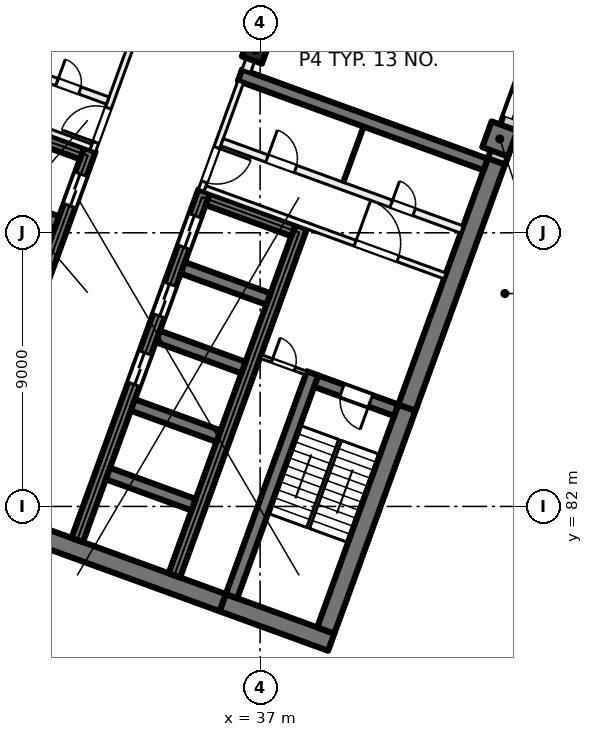
"""IFC4 building model, lengths in metres.
Left out: names, types, materials, properties, quantities, classifications, styles, units other than length and angle.
Written with IfcOpenShell. Run it as: python <this file> out.ifc"""

import sys

from ifc_helpers import new_model, si_unit, direction, frame, frame_2d, origin, origin_2d, place, context, subcontext, project, spatial, rectangle, extrude, element, fill, save


model = new_model("IFC4")
c1 = context("Model", 3, precision=1e-05, world=origin(), true_north=direction((0.0, 1.0)))
c2 = subcontext(c1, "Body", "Model", "MODEL_VIEW")
j1 = project(units=[si_unit("LENGTHUNIT", "METRE"), si_unit("PLANEANGLEUNIT", "RADIAN")], contexts=[c1])
p1 = place(None, origin())
s1 = spatial("IfcSite", under=j1, at=p1, CompositionType="ELEMENT")
p2 = place(p1, origin())
s2 = spatial("IfcBuilding", under=s1, at=p2, CompositionType="ELEMENT")
p3 = place(p2, frame((0.0, 0.0, 43.5)))
s3 = spatial("IfcBuildingStorey", under=s2, at=p3, CompositionType="ELEMENT", Elevation=43.5)
p4 = place(p3, frame((36.849, 97.011, 0.0), z_axis=(0.0, 0.0, 1.0), x_axis=(-0.342020143326, -0.939692620786, 0.0)))
e1 = element("IfcColumn", 1, at=p4, inside=s3, PredefinedType="COLUMN", context=c2, shape_type="SweptSolid", body=[
    extrude(rectangle(XDim=0.7, YDim=0.7, at=origin_2d()), origin(), (0.0, 0.0, 1.0), 4.0),
])
p5 = place(p3, frame((44.884, 94.087, 0.0), z_axis=(0.0, 0.0, 1.0), x_axis=(-0.342020143326, -0.939692620786, 0.0)))
e2 = element("IfcColumn", 2, at=p5, inside=s3, PredefinedType="COLUMN", context=c2, shape_type="SweptSolid", body=[
    extrude(rectangle(XDim=0.9, YDim=0.9, at=origin_2d()), origin(), (0.0, 0.0, 1.0), 4.0),
])
p6 = place(p3, frame((39.338, 77.535, 0.0), z_axis=(0.0, 0.0, 1.0), x_axis=(-0.939701471648, 0.341995824804, 0.0)))
e3 = element("IfcWall", 3, at=p6, inside=s3, PredefinedType="SHEAR", context=c2, shape_type="SweptSolid", body=[
    extrude(rectangle(XDim=3.8, YDim=0.6, at=frame_2d((1.9, 0.0))), origin(), (0.0, 0.0, 1.0), 4.0),
])
p7 = place(p3, frame((35.767, 78.835, 0.0), z_axis=(0.0, 0.0, 1.0), x_axis=(-0.939692894512, 0.342019391267, 0.0)))
e4 = element("IfcWall", 4, at=p7, inside=s3, PredefinedType="SHEAR", context=c2, shape_type="SweptSolid", body=[
    extrude(rectangle(XDim=14.4, YDim=0.6, at=frame_2d((7.2, 0.0))), origin(), (0.0, 0.0, 1.0), 4.0),
])
p8 = place(p3, frame((39.159, 77.92, 0.0), z_axis=(0.0, 0.0, 1.0), x_axis=(0.342016982193, 0.939693771338, 0.0)))
e5 = element("IfcWall", 5, at=p8, inside=s3, PredefinedType="SHEAR", context=c2, shape_type="SweptSolid", body=[
    extrude(rectangle(XDim=7.8, YDim=0.6, at=frame_2d((3.9, 0.0))), origin(), (0.0, 0.0, 1.0), 4.0),
])
p9 = place(p3, frame((41.827, 85.249, 0.0), z_axis=(0.0, 0.0, 1.0), x_axis=(0.342016162452, 0.939694069696, 0.0)))
e6 = element("IfcWall", 6, at=p9, inside=s3, PredefinedType="SHEAR", context=c2, shape_type="SweptSolid", body=[
    extrude(rectangle(XDim=8.9, YDim=0.6, at=frame_2d((4.45, 0.0))), origin(), (0.0, 0.0, 1.0), 4.0),
])
p10 = place(p3, frame((36.058, 79.048, 0.0), z_axis=(0.0, 0.0, 1.0), x_axis=(0.342016982193, 0.939693771338, 0.0)))
e7 = element("IfcWall", 7, at=p10, inside=s3, PredefinedType="SHEAR", context=c2, shape_type="SweptSolid", body=[
    extrude(rectangle(XDim=7.8, YDim=0.4, at=frame_2d((3.9, 0.0))), origin(), (0.0, 0.0, 1.0), 4.0),
])
p11 = place(p3, frame((41.476, 85.164, 0.0), z_axis=(0.0, 0.0, 1.0), x_axis=(-0.939678810556, 0.342058084236, 0.0)))
e8 = element("IfcWall", 8, at=p11, inside=s3, PredefinedType="SHEAR", context=c2, shape_type="SweptSolid", body=[
    extrude(rectangle(XDim=2.8, YDim=0.4, at=frame_2d((1.4, 0.0))), origin(), (0.0, 0.0, 1.0), 4.0),
])
p12 = place(p11, frame((0.9, 0.0, 0.0)))
e9 = element("IfcOpeningElement", 9, at=p12, cuts=e8, PredefinedType="OPENING", context=c2, shape_type="SweptSolid", body=[
    extrude(rectangle(XDim=1.0, YDim=2.1, at=frame_2d((0.5, 1.05))), frame((0.0, 0.21, 0.0), z_axis=(0.0, -1.0, 0.0), x_axis=(1.0, 0.0, 0.0)), (0.0, 0.0, 1.0), 0.42),
])
p13 = place(p3, frame((30.984, 80.895, 0.0), z_axis=(0.0, 0.0, 1.0), x_axis=(0.342021021735, 0.939692301071, 0.0)))
e10 = element("IfcWall", 10, at=p13, inside=s3, PredefinedType="SHEAR", context=c2, shape_type="SweptSolid", body=[
    extrude(rectangle(XDim=12.2, YDim=0.4, at=frame_2d((6.1, 0.0))), origin(), (0.0, 0.0, 1.0), 4.0),
])
p14 = place(p13, frame((5.45, 0.0, 0.0)))
e11 = element("IfcOpeningElement", 11, at=p14, cuts=e10, PredefinedType="OPENING", context=c2, shape_type="SweptSolid", body=[
    extrude(rectangle(XDim=1.1, YDim=2.1, at=frame_2d((0.55, 1.05))), frame((0.0, 0.21, 0.0), z_axis=(0.0, -1.0, 0.0), x_axis=(1.0, 0.0, 0.0)), (0.0, 0.0, 1.0), 0.42),
])
p15 = place(p13, frame((7.85, 0.0, 0.0)))
e12 = element("IfcOpeningElement", 12, at=p15, cuts=e10, PredefinedType="OPENING", context=c2, shape_type="SweptSolid", body=[
    extrude(rectangle(XDim=1.1, YDim=2.1, at=frame_2d((0.55, 1.05))), frame((0.0, 0.21, 0.0), z_axis=(0.0, -1.0, 0.0), x_axis=(1.0, 0.0, 0.0)), (0.0, 0.0, 1.0), 0.42),
])
p16 = place(p13, frame((10.25, 0.0, 0.0)))
e13 = element("IfcOpeningElement", 13, at=p16, cuts=e10, PredefinedType="OPENING", context=c2, shape_type="SweptSolid", body=[
    extrude(rectangle(XDim=1.1, YDim=2.1, at=frame_2d((0.55, 1.05))), frame((0.0, 0.21, 0.0), z_axis=(0.0, -1.0, 0.0), x_axis=(1.0, 0.0, 0.0)), (0.0, 0.0, 1.0), 0.42),
])
p17 = place(p3, frame((34.178, 79.732, 0.0), z_axis=(0.0, 0.0, 1.0), x_axis=(0.342014590177, 0.939694641948, 0.0)))
e14 = element("IfcWall", 14, at=p17, inside=s3, PredefinedType="SHEAR", context=c2, shape_type="SweptSolid", body=[
    extrude(rectangle(XDim=12.2, YDim=0.4, at=frame_2d((6.1, 0.0))), origin(), (0.0, 0.0, 1.0), 4.0),
])
for number, where, z_axis, x_axis in (
    (15, (34.812, 82.056, 0.0), (0.0, 0.0, 1.0), (-0.94, 0.342, 0.0)),
    (16, (35.632, 84.311, 0.0), (0.0, 0.0, 1.0), (-0.94, 0.342, 0.0)),
    (17, (36.453, 86.566, 0.0), (0.0, 0.0, 1.0), (-0.94, 0.342, 0.0)),
    (18, (37.274, 88.822, 0.0), (0.0, 0.0, 1.0), (-0.94, 0.342, 0.0)),
):
    element("IfcWall", number, at=place(p3, frame(where, z_axis=z_axis, x_axis=x_axis)), inside=s3, PredefinedType="SHEAR", context=c2, shape_type="SweptSolid", body=[
        extrude(rectangle(XDim=3.0, YDim=0.4, at=frame_2d((1.5, 0.0))), origin(), (0.0, 0.0, 1.0), 4.0),
    ])
p18 = place(p3, frame((38.095, 91.077, 0.0), z_axis=(0.0, 0.0, 1.0), x_axis=(-0.939676934218, 0.342063238742, 0.0)))
e19 = element("IfcWall", 19, at=p18, inside=s3, PredefinedType="SHEAR", context=c2, shape_type="SweptSolid", body=[
    extrude(rectangle(XDim=3.0, YDim=0.4, at=frame_2d((1.5, 0.0))), origin(), (0.0, 0.0, 1.0), 4.0),
])
p19 = place(p3, frame((27.225, 82.263, 0.0), z_axis=(0.0, 0.0, 1.0), x_axis=(0.342014590177, 0.939694641948, 0.0)))
e20 = element("IfcWall", 20, at=p19, inside=s3, PredefinedType="SHEAR", context=c2, shape_type="SweptSolid", body=[
    extrude(rectangle(XDim=12.2, YDim=0.4, at=frame_2d((6.1, 0.0))), origin(), (0.0, 0.0, 1.0), 4.0),
])
p20 = place(p19, frame((10.25, 0.0, 0.0)))
e21 = element("IfcOpeningElement", 21, at=p20, cuts=e20, PredefinedType="OPENING", context=c2, shape_type="SweptSolid", body=[
    extrude(rectangle(XDim=1.1, YDim=2.1, at=frame_2d((0.55, 1.05))), frame((0.0, 0.21, 0.0), z_axis=(0.0, -1.0, 0.0), x_axis=(1.0, 0.0, 0.0)), (0.0, 0.0, 1.0), 0.42),
])
p21 = place(p19, frame((0.7, 0.0, 0.0)))
e22 = element("IfcOpeningElement", 22, at=p21, cuts=e20, PredefinedType="OPENING", context=c2, shape_type="SweptSolid", body=[
    extrude(rectangle(XDim=0.8, YDim=2.1, at=frame_2d((0.4, 1.05))), frame((0.0, 0.21, 0.0), z_axis=(0.0, -1.0, 0.0), x_axis=(1.0, 0.0, 0.0)), (0.0, 0.0, 1.0), 0.42),
])
for number, where, z_axis, x_axis in (
    (23, (30.32, 91.353, 0.0), (0.0, 0.0, 1.0), (-0.94, 0.342, 0.0)),
    (24, (31.141, 93.608, 0.0), (0.0, 0.0, 1.0), (-0.94, 0.342, 0.0)),
):
    element("IfcWall", number, at=place(p3, frame(where, z_axis=z_axis, x_axis=x_axis)), inside=s3, PredefinedType="SHEAR", context=c2, shape_type="SweptSolid", body=[
        extrude(rectangle(XDim=3.0, YDim=0.4, at=frame_2d((1.5, 0.0))), origin(), (0.0, 0.0, 1.0), 4.0),
    ])
p22 = place(p3, frame((44.418, 93.245, 0.0), z_axis=(0.0, 0.0, 1.0), x_axis=(-0.93969060187, 0.342025690201, 0.0)))
e25 = element("IfcWall", 25, at=p22, inside=s3, PredefinedType="SHEAR", context=c2, shape_type="SweptSolid", body=[
    extrude(rectangle(XDim=8.6, YDim=0.4, at=frame_2d((4.3, 0.0))), origin(), (0.0, 0.0, 1.0), 4.0),
])
p23 = place(p3, frame((52.212, 113.783, 0.0), z_axis=(0.0, 0.0, 1.0), x_axis=(-0.34202521188, -0.939690775968, 0.0)))
e26 = element("IfcWall", 26, at=p23, inside=s3, PredefinedType="SOLIDWALL", context=c2, shape_type="SweptSolid", body=[
    extrude(rectangle(XDim=21.745, YDim=0.6, at=frame_2d((10.873, 0.0))), origin(), (0.0, 0.0, 1.0), 3.625),
])
p24 = place(p23, frame((4.365, 0.0, 0.0)))
e27 = element("IfcOpeningElement", 27, at=p24, cuts=e26, PredefinedType="OPENING", context=c2, shape_type="SweptSolid", body=[
    extrude(rectangle(XDim=1.8, YDim=2.4, at=frame_2d((0.9, 1.2))), frame((0.0, 0.31, 0.0), z_axis=(0.0, -1.0, 0.0), x_axis=(1.0, 0.0, 0.0)), (0.0, 0.0, 1.0), 0.62),
])
p25 = place(p23, frame((8.265, 0.0, 0.9)))
e28 = element("IfcOpeningElement", 28, at=p25, cuts=e26, PredefinedType="OPENING", context=c2, shape_type="SweptSolid", body=[
    extrude(rectangle(XDim=3.0, YDim=2.4, at=frame_2d((1.5, 1.2))), frame((0.0, 0.31, 0.0), z_axis=(0.0, -1.0, 0.0), x_axis=(1.0, 0.0, 0.0)), (0.0, 0.0, 1.0), 0.62),
])
p26 = place(p23, frame((12.765, 0.0, 0.9)))
e29 = element("IfcOpeningElement", 29, at=p26, cuts=e26, PredefinedType="OPENING", context=c2, shape_type="SweptSolid", body=[
    extrude(rectangle(XDim=3.0, YDim=2.4, at=frame_2d((1.5, 1.2))), frame((0.0, 0.31, 0.0), z_axis=(0.0, -1.0, 0.0), x_axis=(1.0, 0.0, 0.0)), (0.0, 0.0, 1.0), 0.62),
])
p27 = place(p23, frame((17.265, 0.0, 0.9)))
e30 = element("IfcOpeningElement", 30, at=p27, cuts=e26, PredefinedType="OPENING", context=c2, shape_type="SweptSolid", body=[
    extrude(rectangle(XDim=3.0, YDim=2.4, at=frame_2d((1.5, 1.2))), frame((0.0, 0.31, 0.0), z_axis=(0.0, -1.0, 0.0), x_axis=(1.0, 0.0, 0.0)), (0.0, 0.0, 1.0), 0.62),
])
p28 = place(p3, frame((31.491, 93.693, 0.0), z_axis=(0.0, 0.0, 1.0), x_axis=(0.341995824804, 0.939701471648, 0.0)))
e31 = element("IfcWall", 31, at=p28, inside=s3, PredefinedType="PARTITIONING", context=c2, shape_type="SweptSolid", body=[
    extrude(rectangle(XDim=3.8, YDim=0.2, at=frame_2d((1.9, 0.0))), origin(), (0.0, 0.0, 1.0), 3.625),
])
p29 = place(p28, frame((0.3, 0.0, 0.0)))
e32 = element("IfcOpeningElement", 32, at=p29, cuts=e31, PredefinedType="OPENING", context=c2, shape_type="SweptSolid", body=[
    extrude(rectangle(XDim=1.2, YDim=2.1, at=frame_2d((0.6, 1.05))), frame((0.0, 0.11, 0.0), z_axis=(0.0, -1.0, 0.0), x_axis=(1.0, 0.0, 0.0)), (0.0, 0.0, 1.0), 0.22),
])
p30 = place(p3, frame((23.538, 96.694, 0.0), z_axis=(0.0, 0.0, 1.0), x_axis=(0.939691552312, -0.342023078919, 0.0)))
e33 = element("IfcWall", 33, at=p30, inside=s3, PredefinedType="PARTITIONING", context=c2, shape_type="SweptSolid", body=[
    extrude(rectangle(XDim=8.4, YDim=0.2, at=frame_2d((4.2, 0.0))), origin(), (0.0, 0.0, 1.0), 3.625),
])
p31 = place(p30, frame((1.65, 0.0, 0.0)))
e34 = element("IfcOpeningElement", 34, at=p31, cuts=e33, PredefinedType="OPENING", context=c2, shape_type="SweptSolid", body=[
    extrude(rectangle(XDim=1.5, YDim=2.1, at=frame_2d((0.75, 1.05))), frame((0.0, 0.11, 0.0), z_axis=(0.0, -1.0, 0.0), x_axis=(1.0, 0.0, 0.0)), (0.0, 0.0, 1.0), 0.22),
])
p32 = place(p3, frame((24.094, 98.221, 0.0), z_axis=(0.0, 0.0, 1.0), x_axis=(0.939691552312, -0.342023078919, 0.0)))
e35 = element("IfcWall", 35, at=p32, inside=s3, PredefinedType="PARTITIONING", context=c2, shape_type="SweptSolid", body=[
    extrude(rectangle(XDim=8.4, YDim=0.25, at=frame_2d((4.2, 0.0))), origin(), (0.0, 0.0, 1.0), 3.625),
])
p33 = place(p32, frame((6.625, 0.0, 0.0)))
e36 = element("IfcOpeningElement", 36, at=p33, cuts=e35, PredefinedType="OPENING", context=c2, shape_type="SweptSolid", body=[
    extrude(rectangle(XDim=0.8, YDim=2.1, at=frame_2d((0.4, 1.05))), frame((0.0, 0.135, 0.0), z_axis=(0.0, -1.0, 0.0), x_axis=(1.0, 0.0, 0.0)), (0.0, 0.0, 1.0), 0.27),
])
p34 = place(p32, frame((2.375, 0.0, 0.0)))
e37 = element("IfcOpeningElement", 37, at=p34, cuts=e35, PredefinedType="OPENING", context=c2, shape_type="SweptSolid", body=[
    extrude(rectangle(XDim=0.8, YDim=2.1, at=frame_2d((0.4, 1.05))), frame((0.0, 0.135, 0.0), z_axis=(0.0, -1.0, 0.0), x_axis=(1.0, 0.0, 0.0)), (0.0, 0.0, 1.0), 0.27),
])
p35 = place(p3, frame((36.362, 95.964, 0.0), z_axis=(0.0, 0.0, 1.0), x_axis=(-0.341995824804, -0.939701471648, 0.0)))
e38 = element("IfcWall", 38, at=p35, inside=s3, PredefinedType="PARTITIONING", context=c2, shape_type="SweptSolid", body=[
    extrude(rectangle(XDim=3.8, YDim=0.2, at=frame_2d((1.9, 0.0))), origin(), (0.0, 0.0, 1.0), 3.625),
])
p36 = place(p35, frame((2.3, 0.0, 0.0)))
e39 = element("IfcOpeningElement", 39, at=p36, cuts=e38, PredefinedType="OPENING", context=c2, shape_type="SweptSolid", body=[
    extrude(rectangle(XDim=1.2, YDim=2.1, at=frame_2d((0.6, 1.05))), frame((0.0, 0.11, 0.0), z_axis=(0.0, -1.0, 0.0), x_axis=(1.0, 0.0, 0.0)), (0.0, 0.0, 1.0), 0.22),
])
p37 = place(p3, frame((35.19, 92.453, 0.0), z_axis=(0.0, 0.0, 1.0), x_axis=(0.939691552312, -0.342023078919, 0.0)))
e40 = element("IfcWall", 40, at=p37, inside=s3, PredefinedType="PARTITIONING", context=c2, shape_type="SweptSolid", body=[
    extrude(rectangle(XDim=8.4, YDim=0.2, at=frame_2d((4.2, 0.0))), origin(), (0.0, 0.0, 1.0), 3.625),
])
p38 = place(p37, frame((5.25, 0.0, 0.0)))
e41 = element("IfcOpeningElement", 41, at=p38, cuts=e40, PredefinedType="OPENING", context=c2, shape_type="SweptSolid", body=[
    extrude(rectangle(XDim=1.5, YDim=2.1, at=frame_2d((0.75, 1.05))), frame((0.0, 0.11, 0.0), z_axis=(0.0, -1.0, 0.0), x_axis=(1.0, 0.0, 0.0)), (0.0, 0.0, 1.0), 0.22),
])
p39 = place(p3, frame((35.746, 93.98, 0.0), z_axis=(0.0, 0.0, 1.0), x_axis=(0.939691552312, -0.342023078919, 0.0)))
e42 = element("IfcWall", 42, at=p39, inside=s3, PredefinedType="PARTITIONING", context=c2, shape_type="SweptSolid", body=[
    extrude(rectangle(XDim=8.4, YDim=0.25, at=frame_2d((4.2, 0.0))), origin(), (0.0, 0.0, 1.0), 3.625),
])
p40 = place(p39, frame((1.575, 0.0, 0.0)))
e43 = element("IfcOpeningElement", 43, at=p40, cuts=e42, PredefinedType="OPENING", context=c2, shape_type="SweptSolid", body=[
    extrude(rectangle(XDim=1.0, YDim=2.1, at=frame_2d((0.5, 1.05))), frame((0.0, 0.135, 0.0), z_axis=(0.0, -1.0, 0.0), x_axis=(1.0, 0.0, 0.0)), (0.0, 0.0, 1.0), 0.27),
])
p41 = place(p39, frame((5.925, 0.0, 0.0)))
e44 = element("IfcOpeningElement", 44, at=p41, cuts=e42, PredefinedType="OPENING", context=c2, shape_type="SweptSolid", body=[
    extrude(rectangle(XDim=0.8, YDim=2.1, at=frame_2d((0.4, 1.05))), frame((0.0, 0.135, 0.0), z_axis=(0.0, -1.0, 0.0), x_axis=(1.0, 0.0, 0.0)), (0.0, 0.0, 1.0), 0.27),
])
p42 = place(p3, frame((37.013, 86.935, 0.0), z_axis=(0.0, 0.0, 1.0), x_axis=(0.939659694648, -0.342110593602, 0.0)))
e45 = element("IfcWall", 45, at=p42, inside=s3, PredefinedType="PARTITIONING", context=c2, shape_type="SweptSolid", body=[
    extrude(rectangle(XDim=1.6, YDim=0.125, at=frame_2d((0.8, 0.0))), origin(), (0.0, 0.0, 1.0), 3.625),
])
p43 = place(p42, frame((0.4, 0.0, 0.0)))
e46 = element("IfcOpeningElement", 46, at=p43, cuts=e45, PredefinedType="OPENING", context=c2, shape_type="SweptSolid", body=[
    extrude(rectangle(XDim=0.8, YDim=2.1, at=frame_2d((0.4, 1.05))), frame((0.0, 0.073, 0.0), z_axis=(0.0, -1.0, 0.0), x_axis=(1.0, 0.0, 0.0)), (0.0, 0.0, 1.0), 0.145),
])
p44 = place(p3, frame((40.403, 94.494, 0.0), z_axis=(0.0, 0.0, 1.0), x_axis=(-0.342064742067, -0.939676386973, 0.0)))
e47 = element("IfcWall", 47, at=p44, inside=s3, PredefinedType="PARTITIONING", context=c2, shape_type="SweptSolid", body=[
    extrude(rectangle(XDim=1.95, YDim=0.1, at=frame_2d((0.975, 0.0))), origin(), (0.0, 0.0, 1.0), 3.625),
])
p45 = place(p3, frame((47.314, 125.909, 0.0), z_axis=(0.0, 0.0, 1.0), x_axis=(-0.342010770371, -0.939696032209, 0.0)))
e48 = element("IfcWall", 48, at=p45, inside=s3, PredefinedType="PARTITIONING", context=c2, shape_type="SweptSolid", body=[
    extrude(rectangle(XDim=31.485, YDim=0.3, at=frame_2d((15.742, 0.0))), origin(), (0.0, 0.0, 1.0), 3.625),
])
p46 = place(p45, frame((28.259, 0.0, 0.0)))
e49 = element("IfcOpeningElement", 49, at=p46, cuts=e48, PredefinedType="OPENING", context=c2, shape_type="SweptSolid", body=[
    extrude(rectangle(XDim=1.2, YDim=2.1, at=frame_2d((0.6, 1.05))), frame((0.0, 0.16, 0.0), z_axis=(0.0, -1.0, 0.0), x_axis=(1.0, 0.0, 0.0)), (0.0, 0.0, 1.0), 0.32),
])
p47 = place(p45, frame((23.484, 0.0, 0.0)))
e50 = element("IfcOpeningElement", 50, at=p47, cuts=e48, PredefinedType="OPENING", context=c2, shape_type="SweptSolid", body=[
    extrude(rectangle(XDim=1.0, YDim=2.1, at=frame_2d((0.5, 1.05))), frame((0.0, 0.16, 0.0), z_axis=(0.0, -1.0, 0.0), x_axis=(1.0, 0.0, 0.0)), (0.0, 0.0, 1.0), 0.32),
])
p48 = place(p45, frame((18.984, 0.0, 0.0)))
e51 = element("IfcOpeningElement", 51, at=p48, cuts=e48, PredefinedType="OPENING", context=c2, shape_type="SweptSolid", body=[
    extrude(rectangle(XDim=1.0, YDim=2.1, at=frame_2d((0.5, 1.05))), frame((0.0, 0.16, 0.0), z_axis=(0.0, -1.0, 0.0), x_axis=(1.0, 0.0, 0.0)), (0.0, 0.0, 1.0), 0.32),
])
p49 = place(p45, frame((14.385, 0.0, 0.0)))
e52 = element("IfcOpeningElement", 52, at=p49, cuts=e48, PredefinedType="OPENING", context=c2, shape_type="SweptSolid", body=[
    extrude(rectangle(XDim=1.2, YDim=2.1, at=frame_2d((0.6, 1.05))), frame((0.0, 0.16, 0.0), z_axis=(0.0, -1.0, 0.0), x_axis=(1.0, 0.0, 0.0)), (0.0, 0.0, 1.0), 0.32),
])
p50 = place(p45, frame((9.885, 0.0, 0.0)))
e53 = element("IfcOpeningElement", 53, at=p50, cuts=e48, PredefinedType="OPENING", context=c2, shape_type="SweptSolid", body=[
    extrude(rectangle(XDim=1.2, YDim=2.1, at=frame_2d((0.6, 1.05))), frame((0.0, 0.16, 0.0), z_axis=(0.0, -1.0, 0.0), x_axis=(1.0, 0.0, 0.0)), (0.0, 0.0, 1.0), 0.32),
])
p51 = place(p45, frame((5.384, 0.0, 0.0)))
e54 = element("IfcOpeningElement", 54, at=p51, cuts=e48, PredefinedType="OPENING", context=c2, shape_type="SweptSolid", body=[
    extrude(rectangle(XDim=1.2, YDim=2.1, at=frame_2d((0.6, 1.05))), frame((0.0, 0.16, 0.0), z_axis=(0.0, -1.0, 0.0), x_axis=(1.0, 0.0, 0.0)), (0.0, 0.0, 1.0), 0.32),
])
p52 = place(p27, origin())
e55 = element("IfcWindow", 55, at=p52, inside=s3, PartitioningType="SINGLE_PANEL", PredefinedType="WINDOW", context=c2, shape_type="SweptSolid", body=[
    extrude(rectangle(XDim=3.0, YDim=2.4, at=frame_2d((1.5, 1.2))), frame((0.0, 0.03, 0.0), z_axis=(0.0, -1.0, 0.0), x_axis=(1.0, 0.0, 0.0)), (0.0, 0.0, 1.0), 0.06),
])
fill(e30, e55)
p53 = place(p20, origin())
e56 = element("IfcDoor", 56, at=p53, inside=s3, OperationType="DOUBLE_DOOR_SLIDING", PredefinedType="DOOR", context=c2, shape_type="SweptSolid", body=[
    extrude(rectangle(XDim=1.1, YDim=2.1, at=frame_2d((0.55, 1.05))), frame((0.0, 0.025, 0.0), z_axis=(0.0, -1.0, 0.0), x_axis=(1.0, 0.0, 0.0)), (0.0, 0.0, 1.0), 0.05),
])
fill(e21, e56)
p54 = place(p14, origin())
e57 = element("IfcDoor", 57, at=p54, inside=s3, OperationType="DOUBLE_DOOR_SLIDING", PredefinedType="DOOR", context=c2, shape_type="SweptSolid", body=[
    extrude(rectangle(XDim=1.1, YDim=2.1, at=frame_2d((0.55, 1.05))), frame((0.0, 0.025, 0.0), z_axis=(0.0, -1.0, 0.0), x_axis=(1.0, 0.0, 0.0)), (0.0, 0.0, 1.0), 0.05),
])
fill(e11, e57)
p55 = place(p15, origin())
e58 = element("IfcDoor", 58, at=p55, inside=s3, OperationType="DOUBLE_DOOR_SLIDING", PredefinedType="DOOR", context=c2, shape_type="SweptSolid", body=[
    extrude(rectangle(XDim=1.1, YDim=2.1, at=frame_2d((0.55, 1.05))), frame((0.0, 0.025, 0.0), z_axis=(0.0, -1.0, 0.0), x_axis=(1.0, 0.0, 0.0)), (0.0, 0.0, 1.0), 0.05),
])
fill(e12, e58)
p56 = place(p16, origin())
e59 = element("IfcDoor", 59, at=p56, inside=s3, OperationType="DOUBLE_DOOR_SLIDING", PredefinedType="DOOR", context=c2, shape_type="SweptSolid", body=[
    extrude(rectangle(XDim=1.1, YDim=2.1, at=frame_2d((0.55, 1.05))), frame((0.0, 0.025, 0.0), z_axis=(0.0, -1.0, 0.0), x_axis=(1.0, 0.0, 0.0)), (0.0, 0.0, 1.0), 0.05),
])
fill(e13, e59)
p57 = place(p29, origin())
e60 = element("IfcDoor", 60, at=p57, inside=s3, OperationType="DOUBLE_DOOR_SINGLE_SWING", PredefinedType="DOOR", context=c2, shape_type="SweptSolid", body=[
    extrude(rectangle(XDim=1.2, YDim=2.1, at=frame_2d((0.6, 1.05))), frame((0.0, 0.025, 0.0), z_axis=(0.0, -1.0, 0.0), x_axis=(1.0, 0.0, 0.0)), (0.0, 0.0, 1.0), 0.05),
])
fill(e32, e60)
p58 = place(p33, origin())
e61 = element("IfcDoor", 61, at=p58, inside=s3, OperationType="SINGLE_SWING_LEFT", PredefinedType="DOOR", context=c2, shape_type="SweptSolid", body=[
    extrude(rectangle(XDim=0.8, YDim=2.1, at=frame_2d((0.4, 1.05))), frame((0.0, 0.025, 0.0), z_axis=(0.0, -1.0, 0.0), x_axis=(1.0, 0.0, 0.0)), (0.0, 0.0, 1.0), 0.05),
])
fill(e36, e61)
p59 = place(p36, origin())
e62 = element("IfcDoor", 62, at=p59, inside=s3, OperationType="DOUBLE_DOOR_SINGLE_SWING", PredefinedType="DOOR", context=c2, shape_type="SweptSolid", body=[
    extrude(rectangle(XDim=1.2, YDim=2.1, at=frame_2d((0.6, 1.05))), frame((0.0, 0.025, 0.0), z_axis=(0.0, -1.0, 0.0), x_axis=(1.0, 0.0, 0.0)), (0.0, 0.0, 1.0), 0.05),
])
fill(e39, e62)
p60 = place(p38, origin())
e63 = element("IfcDoor", 63, at=p60, inside=s3, OperationType="DOUBLE_DOOR_SINGLE_SWING", PredefinedType="DOOR", context=c2, shape_type="SweptSolid", body=[
    extrude(rectangle(XDim=1.5, YDim=2.1, at=frame_2d((0.75, 1.05))), frame((0.0, 0.025, 0.0), z_axis=(0.0, -1.0, 0.0), x_axis=(1.0, 0.0, 0.0)), (0.0, 0.0, 1.0), 0.05),
])
fill(e41, e63)
p61 = place(p12, origin())
e64 = element("IfcDoor", 64, at=p61, inside=s3, OperationType="SINGLE_SWING_RIGHT", PredefinedType="DOOR", context=c2, shape_type="SweptSolid", body=[
    extrude(rectangle(XDim=1.0, YDim=2.1, at=frame_2d((0.5, 1.05))), frame((0.0, 0.025, 0.0), z_axis=(0.0, -1.0, 0.0), x_axis=(1.0, 0.0, 0.0)), (0.0, 0.0, 1.0), 0.05),
])
fill(e9, e64)
p62 = place(p43, origin())
e65 = element("IfcDoor", 65, at=p62, inside=s3, OperationType="SINGLE_SWING_LEFT", PredefinedType="DOOR", context=c2, shape_type="SweptSolid", body=[
    extrude(rectangle(XDim=0.8, YDim=2.1, at=frame_2d((0.4, 1.05))), frame((0.0, 0.025, 0.0), z_axis=(0.0, -1.0, 0.0), x_axis=(1.0, 0.0, 0.0)), (0.0, 0.0, 1.0), 0.05),
])
fill(e46, e65)
p63 = place(p40, origin())
e66 = element("IfcDoor", 66, at=p63, inside=s3, OperationType="SINGLE_SWING_RIGHT", PredefinedType="DOOR", context=c2, shape_type="SweptSolid", body=[
    extrude(rectangle(XDim=1.0, YDim=2.1, at=frame_2d((0.5, 1.05))), frame((0.0, 0.025, 0.0), z_axis=(0.0, -1.0, 0.0), x_axis=(1.0, 0.0, 0.0)), (0.0, 0.0, 1.0), 0.05),
])
fill(e43, e66)
p64 = place(p41, origin())
e67 = element("IfcDoor", 67, at=p64, inside=s3, OperationType="SINGLE_SWING_LEFT", PredefinedType="DOOR", context=c2, shape_type="SweptSolid", body=[
    extrude(rectangle(XDim=0.8, YDim=2.1, at=frame_2d((0.4, 1.05))), frame((0.0, 0.025, 0.0), z_axis=(0.0, -1.0, 0.0), x_axis=(1.0, 0.0, 0.0)), (0.0, 0.0, 1.0), 0.05),
])
fill(e44, e67)
save(model, sys.argv[1])
